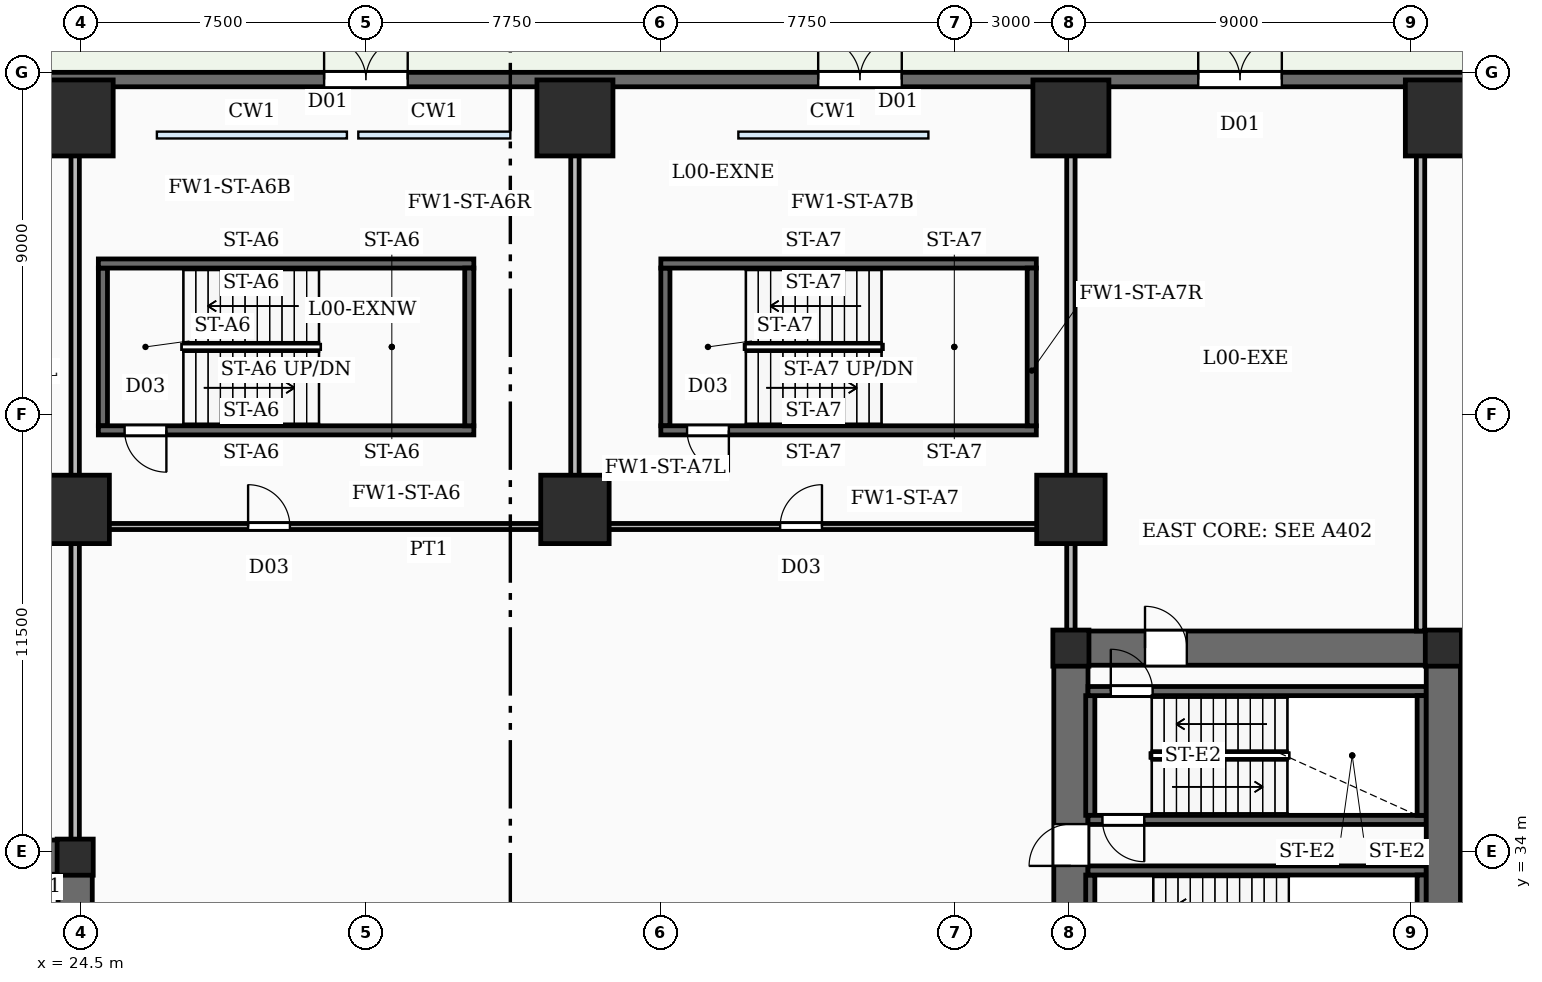
"""IFC4 building model, lengths in metres.
Left out: names, types, materials, properties, quantities, classifications, styles, units other than length and angle.
Written with IfcOpenShell. Run it as: python <this file> out.ifc"""

import sys

from ifc_helpers import new_model, si_unit, direction, frame, frame_2d, origin, origin_2d, place, context, subcontext, project, spatial, rectangle, circle, extrude, element, fill, save


model = new_model("IFC4")
c1 = context("Model", 3, precision=1e-05, world=origin(), true_north=direction((0.0, 1.0)))
c2 = subcontext(c1, "Body", "Model", "MODEL_VIEW")
j1 = project(units=[si_unit("LENGTHUNIT", "METRE"), si_unit("PLANEANGLEUNIT", "RADIAN")], contexts=[c1])
p1 = place(None, origin())
s1 = spatial("IfcSite", under=j1, at=p1, CompositionType="ELEMENT")
p2 = place(p1, origin())
s2 = spatial("IfcBuilding", under=s1, at=p2, CompositionType="ELEMENT")
p3 = place(p2, origin())
s3 = spatial("IfcBuildingStorey", under=s2, at=p3, CompositionType="ELEMENT", Elevation=0.0)
p4 = place(p3, frame((24.35, 19.0, -0.45), z_axis=(0.0, 0.0, 1.0), x_axis=(0.0, 1.0, 0.0)))
e1 = element("IfcWall", 1, at=p4, inside=s3, PredefinedType="SHEAR", context=c2, shape_type="SweptSolid", body=[
    extrude(rectangle(XDim=15.3, YDim=0.9, at=frame_2d((7.65, 0.0))), origin(), (0.0, 0.0, 1.0), 8.1),
])
p5 = place(p4, frame((2.5, 0.0, 0.45)))
e2 = element("IfcOpeningElement", 2, at=p5, cuts=e1, PredefinedType="OPENING", context=c2, shape_type="SweptSolid", body=[
    extrude(rectangle(XDim=1.05, YDim=2.15, at=frame_2d((0.525, 1.075))), frame((0.0, 0.46, 0.0), z_axis=(0.0, -1.0, 0.0), x_axis=(1.0, 0.0, 0.0)), (0.0, 0.0, 1.0), 0.92),
])
p6 = place(p4, frame((7.0, 0.0, 0.45)))
e3 = element("IfcOpeningElement", 3, at=p6, cuts=e1, PredefinedType="OPENING", context=c2, shape_type="SweptSolid", body=[
    extrude(rectangle(XDim=1.05, YDim=2.15, at=frame_2d((0.525, 1.075))), frame((0.0, 0.46, 0.0), z_axis=(0.0, -1.0, 0.0), x_axis=(1.0, 0.0, 0.0)), (0.0, 0.0, 1.0), 0.92),
])
p7 = place(p3, frame((15.0, 33.85, -0.45), z_axis=(0.0, 0.0, 1.0), x_axis=(1.0, 0.0, 0.0)))
e4 = element("IfcWall", 4, at=p7, inside=s3, PredefinedType="SHEAR", context=c2, shape_type="SweptSolid", body=[
    extrude(rectangle(XDim=8.9, YDim=0.9, at=frame_2d((4.45, 0.0))), origin(), (0.0, 0.0, 1.0), 8.1),
])
p8 = place(p7, frame((1.5, 0.0, 0.45)))
e5 = element("IfcOpeningElement", 5, at=p8, cuts=e4, PredefinedType="OPENING", context=c2, shape_type="SweptSolid", body=[
    extrude(rectangle(XDim=1.1, YDim=2.15, at=frame_2d((0.55, 1.075))), frame((0.0, 0.46, 0.0), z_axis=(0.0, -1.0, 0.0), x_axis=(1.0, 0.0, 0.0)), (0.0, 0.0, 1.0), 0.92),
])
p9 = place(p3, frame((50.55, 19.0, -0.45), z_axis=(0.0, 0.0, 1.0), x_axis=(0.0, 1.0, 0.0)))
e6 = element("IfcWall", 6, at=p9, inside=s3, PredefinedType="SHEAR", context=c2, shape_type="SweptSolid", body=[
    extrude(rectangle(XDim=20.8, YDim=0.9, at=frame_2d((10.4, 0.0))), origin(), (0.0, 0.0, 1.0), 8.1),
])
p10 = place(p9, frame((2.5, 0.0, 0.45)))
e7 = element("IfcOpeningElement", 7, at=p10, cuts=e6, PredefinedType="OPENING", context=c2, shape_type="SweptSolid", body=[
    extrude(rectangle(XDim=1.05, YDim=2.15, at=frame_2d((0.525, 1.075))), frame((0.0, 0.46, 0.0), z_axis=(0.0, -1.0, 0.0), x_axis=(1.0, 0.0, 0.0)), (0.0, 0.0, 1.0), 0.92),
])
p11 = place(p9, frame((8.65, 0.0, 0.45)))
e8 = element("IfcOpeningElement", 8, at=p11, cuts=e6, PredefinedType="OPENING", context=c2, shape_type="SweptSolid", body=[
    extrude(rectangle(XDim=1.05, YDim=2.15, at=frame_2d((0.525, 1.075))), frame((0.0, 0.46, 0.0), z_axis=(0.0, -1.0, 0.0), x_axis=(1.0, 0.0, 0.0)), (0.0, 0.0, 1.0), 0.92),
])
p12 = place(p9, frame((14.62, 0.0, 0.45)))
e9 = element("IfcOpeningElement", 9, at=p12, cuts=e6, PredefinedType="OPENING", context=c2, shape_type="SweptSolid", body=[
    extrude(rectangle(XDim=1.1, YDim=2.15, at=frame_2d((0.55, 1.075))), frame((0.0, 0.46, 0.0), z_axis=(0.0, -1.0, 0.0), x_axis=(1.0, 0.0, 0.0)), (0.0, 0.0, 1.0), 0.92),
])
p13 = place(p3, frame((60.35, 19.0, -0.45), z_axis=(0.0, 0.0, 1.0), x_axis=(0.0, 1.0, 0.0)))
e10 = element("IfcWall", 10, at=p13, inside=s3, PredefinedType="SHEAR", context=c2, shape_type="SweptSolid", body=[
    extrude(rectangle(XDim=20.8, YDim=0.9, at=frame_2d((10.4, 0.0))), origin(), (0.0, 0.0, 1.0), 8.1),
])
p14 = place(p3, frame((51.0, 39.35, -0.45), z_axis=(0.0, 0.0, 1.0), x_axis=(1.0, 0.0, 0.0)))
e11 = element("IfcWall", 11, at=p14, inside=s3, PredefinedType="SHEAR", context=c2, shape_type="SweptSolid", body=[
    extrude(rectangle(XDim=8.9, YDim=0.9, at=frame_2d((4.45, 0.0))), origin(), (0.0, 0.0, 1.0), 8.1),
])
p15 = place(p14, frame((1.5, 0.0, 0.45)))
e12 = element("IfcOpeningElement", 12, at=p15, cuts=e11, PredefinedType="OPENING", context=c2, shape_type="SweptSolid", body=[
    extrude(rectangle(XDim=1.1, YDim=2.15, at=frame_2d((0.55, 1.075))), frame((0.0, 0.46, 0.0), z_axis=(0.0, -1.0, 0.0), x_axis=(1.0, 0.0, 0.0)), (0.0, 0.0, 1.0), 0.92),
])
for number, where, z_axis, x_axis in (
    (13, (24.35, 33.85, -0.45), (0.0, 0.0, 1.0), (1.0, 0.0, 0.0)),
    (14, (50.55, 39.35, -0.45), (0.0, 0.0, 1.0), (1.0, 0.0, 0.0)),
    (15, (60.35, 39.35, -0.45), (0.0, 0.0, 1.0), (1.0, 0.0, 0.0)),
):
    element("IfcColumn", number, at=place(p3, frame(where, z_axis=z_axis, x_axis=x_axis)), inside=s3, PredefinedType="COLUMN", context=c2, shape_type="SweptSolid", body=[
        extrude(rectangle(XDim=0.95, YDim=0.95, at=origin_2d()), origin(), (0.0, 0.0, 1.0), 8.1),
    ])
for number, where, z_axis, x_axis in (
    (16, (60.35, 53.3, -0.45), (0.0, 0.0, 1.0), (1.0, 0.0, 0.0)),
    (17, (50.55, 53.3, -0.45), (0.0, 0.0, 1.0), (1.0, 0.0, 0.0)),
    (18, (37.5, 53.3, -0.45), (0.0, 0.0, 1.0), (1.0, 0.0, 0.0)),
    (19, (24.35, 53.3, -0.45), (0.0, 0.0, 1.0), (1.0, 0.0, 0.0)),
):
    element("IfcColumn", number, at=place(p3, frame(where, z_axis=z_axis, x_axis=x_axis)), inside=s3, PredefinedType="COLUMN", context=c2, shape_type="SweptSolid", body=[
        extrude(circle(Radius=1.0, at=origin_2d()), origin(), (0.0, 0.0, 1.0), 8.1),
    ])
for number, where, z_axis, x_axis in (
    (20, (24.35, 43.0, -0.45), (0.0, 0.0, 1.0), (1.0, 0.0, 0.0)),
    (21, (37.5, 43.0, -0.45), (0.0, 0.0, 1.0), (1.0, 0.0, 0.0)),
    (22, (50.55, 43.0, -0.45), (0.0, 0.0, 1.0), (1.0, 0.0, 0.0)),
):
    element("IfcColumn", number, at=place(p3, frame(where, z_axis=z_axis, x_axis=x_axis)), inside=s3, PredefinedType="COLUMN", context=c2, shape_type="SweptSolid", body=[
        extrude(circle(Radius=0.9, at=origin_2d()), origin(), (0.0, 0.0, 1.0), 8.1),
    ])
p16 = place(p3, frame((5.4, 54.31, 0.0), z_axis=(0.0, 0.0, 1.0), x_axis=(1.0, 0.0, 0.0)))
e23 = element("IfcWall", 23, at=p16, inside=s3, PredefinedType="SOLIDWALL", context=c2, shape_type="SweptSolid", body=[
    extrude(rectangle(XDim=68.7, YDim=0.38, at=frame_2d((34.35, 0.0))), origin(), (0.0, 0.0, 1.0), 7.65),
])
p17 = place(p16, frame((63.05, 0.0, 0.0)))
e24 = element("IfcOpeningElement", 24, at=p17, cuts=e23, PredefinedType="OPENING", context=c2, shape_type="SweptSolid", body=[
    extrude(rectangle(XDim=4.2, YDim=3.2, at=frame_2d((2.1, 1.6))), frame((0.0, 0.2, 0.0), z_axis=(0.0, -1.0, 0.0), x_axis=(1.0, 0.0, 0.0)), (0.0, 0.0, 1.0), 0.4),
])
p18 = place(p16, frame((13.3, 0.0, 0.0)))
e25 = element("IfcOpeningElement", 25, at=p18, cuts=e23, PredefinedType="OPENING", context=c2, shape_type="SweptSolid", body=[
    extrude(rectangle(XDim=2.2, YDim=2.4, at=frame_2d((1.1, 1.2))), frame((0.0, 0.2, 0.0), z_axis=(0.0, -1.0, 0.0), x_axis=(1.0, 0.0, 0.0)), (0.0, 0.0, 1.0), 0.4),
])
p19 = place(p16, frame((25.5, 0.0, 0.0)))
e26 = element("IfcOpeningElement", 26, at=p19, cuts=e23, PredefinedType="OPENING", context=c2, shape_type="SweptSolid", body=[
    extrude(rectangle(XDim=2.2, YDim=2.4, at=frame_2d((1.1, 1.2))), frame((0.0, 0.2, 0.0), z_axis=(0.0, -1.0, 0.0), x_axis=(1.0, 0.0, 0.0)), (0.0, 0.0, 1.0), 0.4),
])
p20 = place(p16, frame((38.5, 0.0, 0.0)))
e27 = element("IfcOpeningElement", 27, at=p20, cuts=e23, PredefinedType="OPENING", context=c2, shape_type="SweptSolid", body=[
    extrude(rectangle(XDim=2.2, YDim=2.4, at=frame_2d((1.1, 1.2))), frame((0.0, 0.2, 0.0), z_axis=(0.0, -1.0, 0.0), x_axis=(1.0, 0.0, 0.0)), (0.0, 0.0, 1.0), 0.4),
])
p21 = place(p16, frame((48.5, 0.0, 0.0)))
e28 = element("IfcOpeningElement", 28, at=p21, cuts=e23, PredefinedType="OPENING", context=c2, shape_type="SweptSolid", body=[
    extrude(rectangle(XDim=2.2, YDim=2.4, at=frame_2d((1.1, 1.2))), frame((0.0, 0.2, 0.0), z_axis=(0.0, -1.0, 0.0), x_axis=(1.0, 0.0, 0.0)), (0.0, 0.0, 1.0), 0.4),
])
p22 = place(p16, frame((57.0, 0.0, 0.0)))
e29 = element("IfcOpeningElement", 29, at=p22, cuts=e23, PredefinedType="OPENING", context=c2, shape_type="SweptSolid", body=[
    extrude(rectangle(XDim=2.2, YDim=2.4, at=frame_2d((1.1, 1.2))), frame((0.0, 0.2, 0.0), z_axis=(0.0, -1.0, 0.0), x_axis=(1.0, 0.0, 0.0)), (0.0, 0.0, 1.0), 0.4),
])
p23 = place(p3, frame((34.84, 45.08, 0.0), z_axis=(0.0, 0.0, 1.0), x_axis=(-1.0, 0.0, 0.0)))
e30 = element("IfcWall", 30, at=p23, inside=s3, PredefinedType="SOLIDWALL", context=c2, shape_type="SweptSolid", body=[
    extrude(rectangle(XDim=9.88, YDim=0.24, at=frame_2d((4.94, 0.0))), origin(), (0.0, 0.0, 1.0), 7.65),
])
p24 = place(p23, frame((8.09, 0.0, 0.0)))
e31 = element("IfcOpeningElement", 31, at=p24, cuts=e30, PredefinedType="OPENING", context=c2, shape_type="SweptSolid", body=[
    extrude(rectangle(XDim=1.1, YDim=2.15, at=frame_2d((0.55, 1.075))), frame((0.0, 0.13, 0.0), z_axis=(0.0, -1.0, 0.0), x_axis=(1.0, 0.0, 0.0)), (0.0, 0.0, 1.0), 0.26),
])
p25 = place(p3, frame((24.96, 49.47, 0.0), z_axis=(0.0, 0.0, 1.0), x_axis=(1.0, 0.0, 0.0)))
e32 = element("IfcWall", 32, at=p25, inside=s3, PredefinedType="SOLIDWALL", context=c2, shape_type="SweptSolid", body=[
    extrude(rectangle(XDim=9.88, YDim=0.24, at=frame_2d((4.94, 0.0))), origin(), (0.0, 0.0, 1.0), 7.65),
])
for number, where, z_axis, x_axis in (
    (33, (25.08, 45.2, 0.0), (0.0, 0.0, 1.0), (0.0, 1.0, 0.0)),
    (34, (34.72, 45.2, 0.0), (0.0, 0.0, 1.0), (0.0, 1.0, 0.0)),
):
    element("IfcWall", number, at=place(p3, frame(where, z_axis=z_axis, x_axis=x_axis)), inside=s3, PredefinedType="SOLIDWALL", context=c2, shape_type="SweptSolid", body=[
        extrude(rectangle(XDim=4.15, YDim=0.24, at=frame_2d((2.075, 0.0))), origin(), (0.0, 0.0, 1.0), 7.65),
    ])
p26 = place(p3, frame((49.64, 45.08, 0.0), z_axis=(0.0, 0.0, 1.0), x_axis=(-1.0, 0.0, 0.0)))
e35 = element("IfcWall", 35, at=p26, inside=s3, PredefinedType="SOLIDWALL", context=c2, shape_type="SweptSolid", body=[
    extrude(rectangle(XDim=9.88, YDim=0.24, at=frame_2d((4.94, 0.0))), origin(), (0.0, 0.0, 1.0), 7.65),
])
p27 = place(p26, frame((8.09, 0.0, 0.0)))
e36 = element("IfcOpeningElement", 36, at=p27, cuts=e35, PredefinedType="OPENING", context=c2, shape_type="SweptSolid", body=[
    extrude(rectangle(XDim=1.1, YDim=2.15, at=frame_2d((0.55, 1.075))), frame((0.0, 0.13, 0.0), z_axis=(0.0, -1.0, 0.0), x_axis=(1.0, 0.0, 0.0)), (0.0, 0.0, 1.0), 0.26),
])
p28 = place(p3, frame((39.76, 49.47, 0.0), z_axis=(0.0, 0.0, 1.0), x_axis=(1.0, 0.0, 0.0)))
e37 = element("IfcWall", 37, at=p28, inside=s3, PredefinedType="SOLIDWALL", context=c2, shape_type="SweptSolid", body=[
    extrude(rectangle(XDim=9.88, YDim=0.24, at=frame_2d((4.94, 0.0))), origin(), (0.0, 0.0, 1.0), 7.65),
])
for number, where, z_axis, x_axis in (
    (38, (39.88, 45.2, 0.0), (0.0, 0.0, 1.0), (0.0, 1.0, 0.0)),
    (39, (49.52, 45.2, 0.0), (0.0, 0.0, 1.0), (0.0, 1.0, 0.0)),
):
    element("IfcWall", number, at=place(p3, frame(where, z_axis=z_axis, x_axis=x_axis)), inside=s3, PredefinedType="SOLIDWALL", context=c2, shape_type="SweptSolid", body=[
        extrude(rectangle(XDim=4.15, YDim=0.24, at=frame_2d((2.075, 0.0))), origin(), (0.0, 0.0, 1.0), 7.65),
    ])
p29 = place(p3, frame((51.0, 33.5, 0.0), z_axis=(0.0, 0.0, 1.0), x_axis=(1.0, 0.0, 0.0)))
e40 = element("IfcWall", 40, at=p29, inside=s3, PredefinedType="SOLIDWALL", context=c2, shape_type="SweptSolid", body=[
    extrude(rectangle(XDim=8.9, YDim=0.24, at=frame_2d((4.45, 0.0))), origin(), (0.0, 0.0, 1.0), 7.65),
])
for number, where, z_axis, x_axis in (
    (41, (51.06, 30.15, 0.0), (0.0, 0.0, 1.0), (0.0, 1.0, 0.0)),
    (42, (59.78, 30.15, 0.0), (0.0, 0.0, 1.0), (0.0, 1.0, 0.0)),
):
    element("IfcWall", number, at=place(p3, frame(where, z_axis=z_axis, x_axis=x_axis)), inside=s3, PredefinedType="SOLIDWALL", context=c2, shape_type="SweptSolid", body=[
        extrude(rectangle(XDim=3.23, YDim=0.24, at=frame_2d((1.615, 0.0))), origin(), (0.0, 0.0, 1.0), 7.65),
    ])
p30 = place(p3, frame((59.9, 34.83, 0.0), z_axis=(0.0, 0.0, 1.0), x_axis=(-1.0, 0.0, 0.0)))
e43 = element("IfcWall", 43, at=p30, inside=s3, PredefinedType="SOLIDWALL", context=c2, shape_type="SweptSolid", body=[
    extrude(rectangle(XDim=8.9, YDim=0.24, at=frame_2d((4.45, 0.0))), origin(), (0.0, 0.0, 1.0), 7.65),
])
p31 = place(p30, frame((7.42, 0.0, 0.0)))
e44 = element("IfcOpeningElement", 44, at=p31, cuts=e43, PredefinedType="OPENING", context=c2, shape_type="SweptSolid", body=[
    extrude(rectangle(XDim=1.1, YDim=2.15, at=frame_2d((0.55, 1.075))), frame((0.0, 0.13, 0.0), z_axis=(0.0, -1.0, 0.0), x_axis=(1.0, 0.0, 0.0)), (0.0, 0.0, 1.0), 0.26),
])
p32 = place(p3, frame((51.0, 38.22, 0.0), z_axis=(0.0, 0.0, 1.0), x_axis=(1.0, 0.0, 0.0)))
e45 = element("IfcWall", 45, at=p32, inside=s3, PredefinedType="SOLIDWALL", context=c2, shape_type="SweptSolid", body=[
    extrude(rectangle(XDim=8.9, YDim=0.24, at=frame_2d((4.45, 0.0))), origin(), (0.0, 0.0, 1.0), 7.65),
])
p33 = place(p32, frame((0.6, 0.0, 0.0)))
e46 = element("IfcOpeningElement", 46, at=p33, cuts=e45, PredefinedType="OPENING", context=c2, shape_type="SweptSolid", body=[
    extrude(rectangle(XDim=1.1, YDim=2.15, at=frame_2d((0.55, 1.075))), frame((0.0, 0.13, 0.0), z_axis=(0.0, -1.0, 0.0), x_axis=(1.0, 0.0, 0.0)), (0.0, 0.0, 1.0), 0.26),
])
for number, where, z_axis, x_axis in (
    (47, (51.06, 34.95, 0.0), (0.0, 0.0, 1.0), (0.0, 1.0, 0.0)),
    (48, (59.78, 34.95, 0.0), (0.0, 0.0, 1.0), (0.0, 1.0, 0.0)),
):
    element("IfcWall", number, at=place(p3, frame(where, z_axis=z_axis, x_axis=x_axis)), inside=s3, PredefinedType="SOLIDWALL", context=c2, shape_type="SweptSolid", body=[
        extrude(rectangle(XDim=3.15, YDim=0.24, at=frame_2d((1.575, 0.0))), origin(), (0.0, 0.0, 1.0), 7.65),
    ])
p34 = place(p3, frame((24.35, 34.3, 0.0), z_axis=(0.0, 0.0, 1.0), x_axis=(0.0, 1.0, 0.0)))
e49 = element("IfcWall", 49, at=p34, inside=s3, PredefinedType="SOLIDWALL", context=c2, shape_type="SweptSolid", body=[
    extrude(rectangle(XDim=19.8, YDim=0.22, at=frame_2d((9.9, 0.0))), origin(), (0.0, 0.0, 1.0), 6.71),
])
for number, where, z_axis, x_axis in (
    (50, (50.55, 39.8, 0.0), (0.0, 0.0, 1.0), (0.0, 1.0, 0.0)),
    (51, (59.75, 39.8, 0.0), (0.0, 0.0, 1.0), (0.0, 1.0, 0.0)),
):
    element("IfcWall", number, at=place(p3, frame(where, z_axis=z_axis, x_axis=x_axis)), inside=s3, PredefinedType="SOLIDWALL", context=c2, shape_type="SweptSolid", body=[
        extrude(rectangle(XDim=14.3, YDim=0.22, at=frame_2d((7.15, 0.0))), origin(), (0.0, 0.0, 1.0), 6.71),
    ])
p35 = place(p3, frame((37.5, 42.6, 0.0), z_axis=(0.0, 0.0, 1.0), x_axis=(0.0, 1.0, 0.0)))
e52 = element("IfcWall", 52, at=p35, inside=s3, PredefinedType="SOLIDWALL", context=c2, shape_type="SweptSolid", body=[
    extrude(rectangle(XDim=11.5, YDim=0.22, at=frame_2d((5.75, 0.0))), origin(), (0.0, 0.0, 1.0), 6.71),
])
p36 = place(p3, frame((24.7, 42.55, 0.0), z_axis=(0.0, 0.0, 1.0), x_axis=(1.0, 0.0, 0.0)))
e53 = element("IfcWall", 53, at=p36, inside=s3, PredefinedType="PARTITIONING", context=c2, shape_type="SweptSolid", body=[
    extrude(rectangle(XDim=25.6, YDim=0.16, at=frame_2d((12.8, 0.0))), origin(), (0.0, 0.0, 1.0), 6.71),
])
p37 = place(p36, frame((4.2, 0.0, 0.0)))
e54 = element("IfcOpeningElement", 54, at=p37, cuts=e53, PredefinedType="OPENING", context=c2, shape_type="SweptSolid", body=[
    extrude(rectangle(XDim=1.1, YDim=2.15, at=frame_2d((0.55, 1.075))), frame((0.0, 0.09, 0.0), z_axis=(0.0, -1.0, 0.0), x_axis=(1.0, 0.0, 0.0)), (0.0, 0.0, 1.0), 0.18),
])
p38 = place(p36, frame((18.2, 0.0, 0.0)))
e55 = element("IfcOpeningElement", 55, at=p38, cuts=e53, PredefinedType="OPENING", context=c2, shape_type="SweptSolid", body=[
    extrude(rectangle(XDim=1.1, YDim=2.15, at=frame_2d((0.55, 1.075))), frame((0.0, 0.09, 0.0), z_axis=(0.0, -1.0, 0.0), x_axis=(1.0, 0.0, 0.0)), (0.0, 0.0, 1.0), 0.18),
])
p39 = place(p19, origin())
e56 = element("IfcDoor", 56, at=p39, inside=s3, OperationType="DOUBLE_DOOR_SINGLE_SWING", PredefinedType="DOOR", context=c2, shape_type="SweptSolid", body=[
    extrude(rectangle(XDim=2.2, YDim=2.4, at=frame_2d((1.1, 1.2))), frame((0.0, 0.025, 0.0), z_axis=(0.0, -1.0, 0.0), x_axis=(1.0, 0.0, 0.0)), (0.0, 0.0, 1.0), 0.05),
])
fill(e26, e56)
p40 = place(p20, origin())
e57 = element("IfcDoor", 57, at=p40, inside=s3, OperationType="DOUBLE_DOOR_SINGLE_SWING", PredefinedType="DOOR", context=c2, shape_type="SweptSolid", body=[
    extrude(rectangle(XDim=2.2, YDim=2.4, at=frame_2d((1.1, 1.2))), frame((0.0, 0.025, 0.0), z_axis=(0.0, -1.0, 0.0), x_axis=(1.0, 0.0, 0.0)), (0.0, 0.0, 1.0), 0.05),
])
fill(e27, e57)
p41 = place(p21, origin())
e58 = element("IfcDoor", 58, at=p41, inside=s3, OperationType="DOUBLE_DOOR_SINGLE_SWING", PredefinedType="DOOR", context=c2, shape_type="SweptSolid", body=[
    extrude(rectangle(XDim=2.2, YDim=2.4, at=frame_2d((1.1, 1.2))), frame((0.0, 0.025, 0.0), z_axis=(0.0, -1.0, 0.0), x_axis=(1.0, 0.0, 0.0)), (0.0, 0.0, 1.0), 0.05),
])
fill(e28, e58)
p42 = place(p24, origin())
e59 = element("IfcDoor", 59, at=p42, inside=s3, OperationType="SINGLE_SWING_LEFT", PredefinedType="DOOR", context=c2, shape_type="SweptSolid", body=[
    extrude(rectangle(XDim=1.1, YDim=2.15, at=frame_2d((0.55, 1.075))), frame((0.0, 0.025, 0.0), z_axis=(0.0, -1.0, 0.0), x_axis=(1.0, 0.0, 0.0)), (0.0, 0.0, 1.0), 0.05),
])
fill(e31, e59)
p43 = place(p27, origin())
e60 = element("IfcDoor", 60, at=p43, inside=s3, OperationType="SINGLE_SWING_LEFT", PredefinedType="DOOR", context=c2, shape_type="SweptSolid", body=[
    extrude(rectangle(XDim=1.1, YDim=2.15, at=frame_2d((0.55, 1.075))), frame((0.0, 0.025, 0.0), z_axis=(0.0, -1.0, 0.0), x_axis=(1.0, 0.0, 0.0)), (0.0, 0.0, 1.0), 0.05),
])
fill(e36, e60)
p44 = place(p12, origin())
e61 = element("IfcDoor", 61, at=p44, inside=s3, OperationType="SINGLE_SWING_LEFT", PredefinedType="DOOR", context=c2, shape_type="SweptSolid", body=[
    extrude(rectangle(XDim=1.1, YDim=2.15, at=frame_2d((0.55, 1.075))), frame((0.0, 0.025, 0.0), z_axis=(0.0, -1.0, 0.0), x_axis=(1.0, 0.0, 0.0)), (0.0, 0.0, 1.0), 0.05),
])
fill(e9, e61)
p45 = place(p15, origin())
e62 = element("IfcDoor", 62, at=p45, inside=s3, OperationType="SINGLE_SWING_LEFT", PredefinedType="DOOR", context=c2, shape_type="SweptSolid", body=[
    extrude(rectangle(XDim=1.1, YDim=2.15, at=frame_2d((0.55, 1.075))), frame((0.0, 0.025, 0.0), z_axis=(0.0, -1.0, 0.0), x_axis=(1.0, 0.0, 0.0)), (0.0, 0.0, 1.0), 0.05),
])
fill(e12, e62)
p46 = place(p31, origin())
e63 = element("IfcDoor", 63, at=p46, inside=s3, OperationType="SINGLE_SWING_LEFT", PredefinedType="DOOR", context=c2, shape_type="SweptSolid", body=[
    extrude(rectangle(XDim=1.1, YDim=2.15, at=frame_2d((0.55, 1.075))), frame((0.0, 0.025, 0.0), z_axis=(0.0, -1.0, 0.0), x_axis=(1.0, 0.0, 0.0)), (0.0, 0.0, 1.0), 0.05),
])
fill(e44, e63)
p47 = place(p33, origin())
e64 = element("IfcDoor", 64, at=p47, inside=s3, OperationType="SINGLE_SWING_LEFT", PredefinedType="DOOR", context=c2, shape_type="SweptSolid", body=[
    extrude(rectangle(XDim=1.1, YDim=2.15, at=frame_2d((0.55, 1.075))), frame((0.0, 0.025, 0.0), z_axis=(0.0, -1.0, 0.0), x_axis=(1.0, 0.0, 0.0)), (0.0, 0.0, 1.0), 0.05),
])
fill(e46, e64)
p48 = place(p37, origin())
e65 = element("IfcDoor", 65, at=p48, inside=s3, OperationType="SINGLE_SWING_LEFT", PredefinedType="DOOR", context=c2, shape_type="SweptSolid", body=[
    extrude(rectangle(XDim=1.1, YDim=2.15, at=frame_2d((0.55, 1.075))), frame((0.0, 0.025, 0.0), z_axis=(0.0, -1.0, 0.0), x_axis=(1.0, 0.0, 0.0)), (0.0, 0.0, 1.0), 0.05),
])
fill(e54, e65)
p49 = place(p38, origin())
e66 = element("IfcDoor", 66, at=p49, inside=s3, OperationType="SINGLE_SWING_RIGHT", PredefinedType="DOOR", context=c2, shape_type="SweptSolid", body=[
    extrude(rectangle(XDim=1.1, YDim=2.15, at=frame_2d((0.55, 1.075))), frame((0.0, 0.025, 0.0), z_axis=(0.0, -1.0, 0.0), x_axis=(1.0, 0.0, 0.0)), (0.0, 0.0, 1.0), 0.05),
])
fill(e55, e66)
save(model, sys.argv[1])
